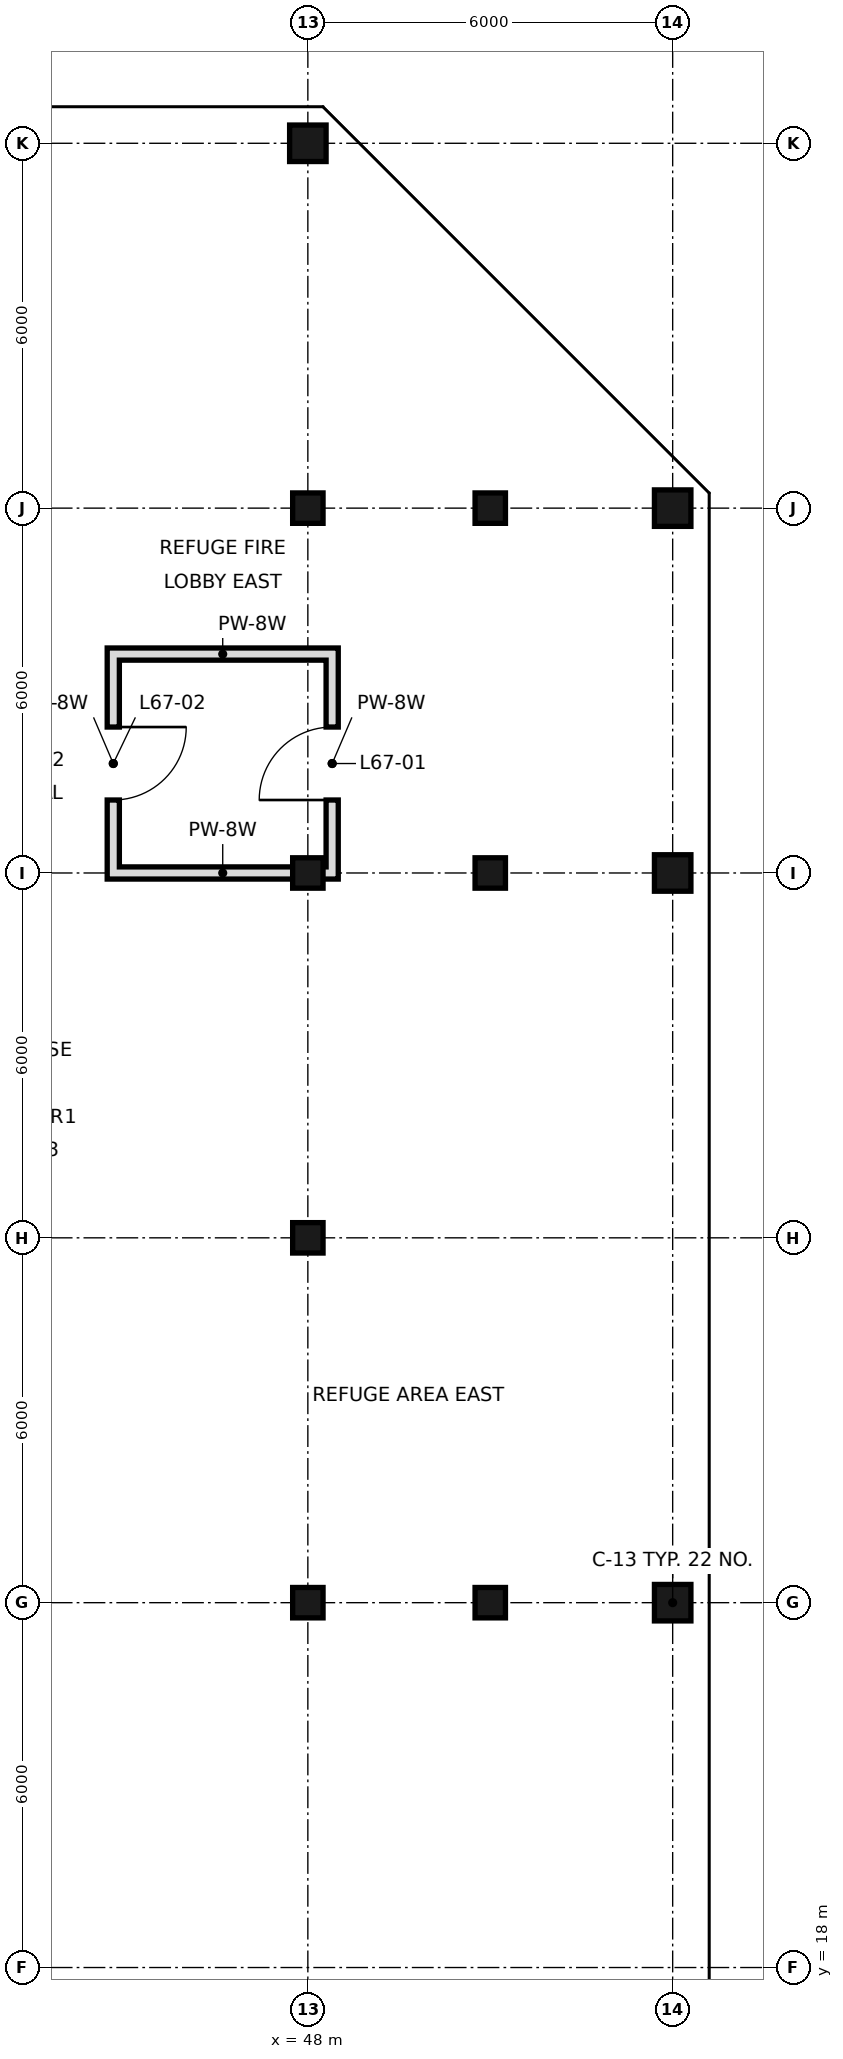
"""IFC4 building model, lengths in metres.
Left out: names, types, materials, properties, quantities, classifications, styles, units other than length and angle.
Written with IfcOpenShell. Run it as: python <this file> out.ifc"""

import sys

from ifc_helpers import new_model, si_unit, direction, frame, frame_2d, origin, origin_2d, place, context, subcontext, project, spatial, rectangle, hollow_rectangle, extrude, element, fill, save


model = new_model("IFC4")
c1 = context("Model", 3, precision=1e-05, world=origin(), true_north=direction((0.0, 1.0)))
c2 = subcontext(c1, "Body", "Model", "MODEL_VIEW")
j1 = project(units=[si_unit("LENGTHUNIT", "METRE"), si_unit("PLANEANGLEUNIT", "RADIAN")], contexts=[c1])
p1 = place(None, origin())
s1 = spatial("IfcSite", under=j1, at=p1, CompositionType="ELEMENT")
p2 = place(p1, origin())
s2 = spatial("IfcBuilding", under=s1, at=p2, CompositionType="ELEMENT")
p3 = place(p2, frame((0.0, 0.0, 281.8)))
s3 = spatial("IfcBuildingStorey", under=s2, at=p3, CompositionType="ELEMENT", Elevation=281.8)
p4 = place(p3, frame((48.0, 24.0, 0.0), z_axis=(0.0, 0.0, 1.0), x_axis=(1.0, 0.0, 0.0)))
e1 = element("IfcColumn", 1, at=p4, inside=s3, PredefinedType="COLUMN", context=c2, shape_type="SweptSolid", body=[
    extrude(hollow_rectangle(XDim=0.5, YDim=0.5, WallThickness=0.025, at=origin_2d()), origin(), (0.0, 0.0, 1.0), 9.0),
])
p5 = place(p3, frame((48.0, 30.0, 0.0), z_axis=(0.0, 0.0, 1.0), x_axis=(1.0, 0.0, 0.0)))
e2 = element("IfcColumn", 2, at=p5, inside=s3, PredefinedType="COLUMN", context=c2, shape_type="SweptSolid", body=[
    extrude(hollow_rectangle(XDim=0.5, YDim=0.5, WallThickness=0.025, at=origin_2d()), origin(), (0.0, 0.0, 1.0), 8.7),
])
for number, where, z_axis, x_axis in (
    (3, (48.0, 36.0, 0.0), (0.0, 0.0, 1.0), (1.0, 0.0, 0.0)),
    (4, (48.0, 42.0, 0.0), (0.0, 0.0, 1.0), (1.0, 0.0, 0.0)),
):
    element("IfcColumn", number, at=place(p3, frame(where, z_axis=z_axis, x_axis=x_axis)), inside=s3, PredefinedType="COLUMN", context=c2, shape_type="SweptSolid", body=[
        extrude(hollow_rectangle(XDim=0.5, YDim=0.5, WallThickness=0.025, at=origin_2d()), origin(), (0.0, 0.0, 1.0), 9.0),
    ])
for number, where, z_axis, x_axis in (
    (5, (48.0, 48.0, 0.0), (0.0, 0.0, 1.0), (1.0, 0.0, 0.0)),
    (6, (54.0, 24.0, 0.0), (0.0, 0.0, 1.0), (1.0, 0.0, 0.0)),
    (7, (54.0, 36.0, 0.0), (0.0, 0.0, 1.0), (1.0, 0.0, 0.0)),
    (8, (54.0, 42.0, 0.0), (0.0, 0.0, 1.0), (1.0, 0.0, 0.0)),
):
    element("IfcColumn", number, at=place(p3, frame(where, z_axis=z_axis, x_axis=x_axis)), inside=s3, PredefinedType="COLUMN", context=c2, shape_type="SweptSolid", body=[
        extrude(hollow_rectangle(XDim=0.6, YDim=0.6, WallThickness=0.028, at=origin_2d()), origin(), (0.0, 0.0, 1.0), 9.0),
    ])
for number, where, z_axis, x_axis in (
    (9, (51.0, 24.0, 1.3), (0.0, 0.0, 1.0), (1.0, 0.0, 0.0)),
    (10, (51.0, 36.0, 1.3), (0.0, 0.0, 1.0), (1.0, 0.0, 0.0)),
    (11, (51.0, 42.0, 1.3), (0.0, 0.0, 1.0), (1.0, 0.0, 0.0)),
):
    element("IfcColumn", number, at=place(p3, frame(where, z_axis=z_axis, x_axis=x_axis)), inside=s3, PredefinedType="COLUMN", context=c2, shape_type="SweptSolid", body=[
        extrude(hollow_rectangle(XDim=0.5, YDim=0.5, WallThickness=0.032, at=origin_2d()), origin(), (0.0, 0.0, 1.0), 6.1),
    ])
p6 = place(p3, frame((44.8, 35.9, 0.0), z_axis=(0.0, 0.0, 1.0), x_axis=(0.0, 1.0, 0.0)))
e12 = element("IfcWall", 12, at=p6, inside=s3, PredefinedType="SOLIDWALL", context=c2, shape_type="SweptSolid", body=[
    extrude(rectangle(XDim=3.8, YDim=0.2, at=frame_2d((1.9, 0.0))), origin(), (0.0, 0.0, 1.0), 8.7),
])
p7 = place(p6, frame((1.3, 0.0, 0.0)))
e13 = element("IfcOpeningElement", 13, at=p7, cuts=e12, PredefinedType="OPENING", context=c2, shape_type="SweptSolid", body=[
    extrude(rectangle(XDim=1.2, YDim=2.4, at=frame_2d((0.6, 1.2))), frame((0.0, 0.11, 0.0), z_axis=(0.0, -1.0, 0.0), x_axis=(1.0, 0.0, 0.0)), (0.0, 0.0, 1.0), 0.22),
])
p8 = place(p3, frame((48.4, 35.9, 0.0), z_axis=(0.0, 0.0, 1.0), x_axis=(0.0, 1.0, 0.0)))
e14 = element("IfcWall", 14, at=p8, inside=s3, PredefinedType="SOLIDWALL", context=c2, shape_type="SweptSolid", body=[
    extrude(rectangle(XDim=3.8, YDim=0.2, at=frame_2d((1.9, 0.0))), origin(), (0.0, 0.0, 1.0), 8.7),
])
p9 = place(p8, frame((1.3, 0.0, 0.0)))
e15 = element("IfcOpeningElement", 15, at=p9, cuts=e14, PredefinedType="OPENING", context=c2, shape_type="SweptSolid", body=[
    extrude(rectangle(XDim=1.2, YDim=2.4, at=frame_2d((0.6, 1.2))), frame((0.0, 0.11, 0.0), z_axis=(0.0, -1.0, 0.0), x_axis=(1.0, 0.0, 0.0)), (0.0, 0.0, 1.0), 0.22),
])
p10 = place(p3, frame((44.9, 36.0, 0.0), z_axis=(0.0, 0.0, 1.0), x_axis=(1.0, 0.0, 0.0)))
e16 = element("IfcWall", 16, at=p10, inside=s3, PredefinedType="SOLIDWALL", context=c2, shape_type="SweptSolid", body=[
    extrude(rectangle(XDim=3.4, YDim=0.2, at=frame_2d((1.7, 0.0))), origin(), (0.0, 0.0, 1.0), 8.7),
])
p11 = place(p3, frame((44.9, 39.6, 0.0), z_axis=(0.0, 0.0, 1.0), x_axis=(1.0, 0.0, 0.0)))
e17 = element("IfcWall", 17, at=p11, inside=s3, PredefinedType="SOLIDWALL", context=c2, shape_type="SweptSolid", body=[
    extrude(rectangle(XDim=3.4, YDim=0.2, at=frame_2d((1.7, 0.0))), origin(), (0.0, 0.0, 1.0), 8.25),
])
p12 = place(p9, origin())
e18 = element("IfcDoor", 18, at=p12, inside=s3, OperationType="SINGLE_SWING_LEFT", PredefinedType="DOOR", context=c2, shape_type="SweptSolid", body=[
    extrude(rectangle(XDim=1.2, YDim=2.4, at=frame_2d((0.6, 1.2))), frame((0.0, 0.025, 0.0), z_axis=(0.0, -1.0, 0.0), x_axis=(1.0, 0.0, 0.0)), (0.0, 0.0, 1.0), 0.05),
])
fill(e15, e18)
p13 = place(p7, origin())
e19 = element("IfcDoor", 19, at=p13, inside=s3, OperationType="SINGLE_SWING_RIGHT", PredefinedType="DOOR", context=c2, shape_type="SweptSolid", body=[
    extrude(rectangle(XDim=1.2, YDim=2.4, at=frame_2d((0.6, 1.2))), frame((0.0, 0.025, 0.0), z_axis=(0.0, -1.0, 0.0), x_axis=(1.0, 0.0, 0.0)), (0.0, 0.0, 1.0), 0.05),
])
fill(e13, e19)
save(model, sys.argv[1])
